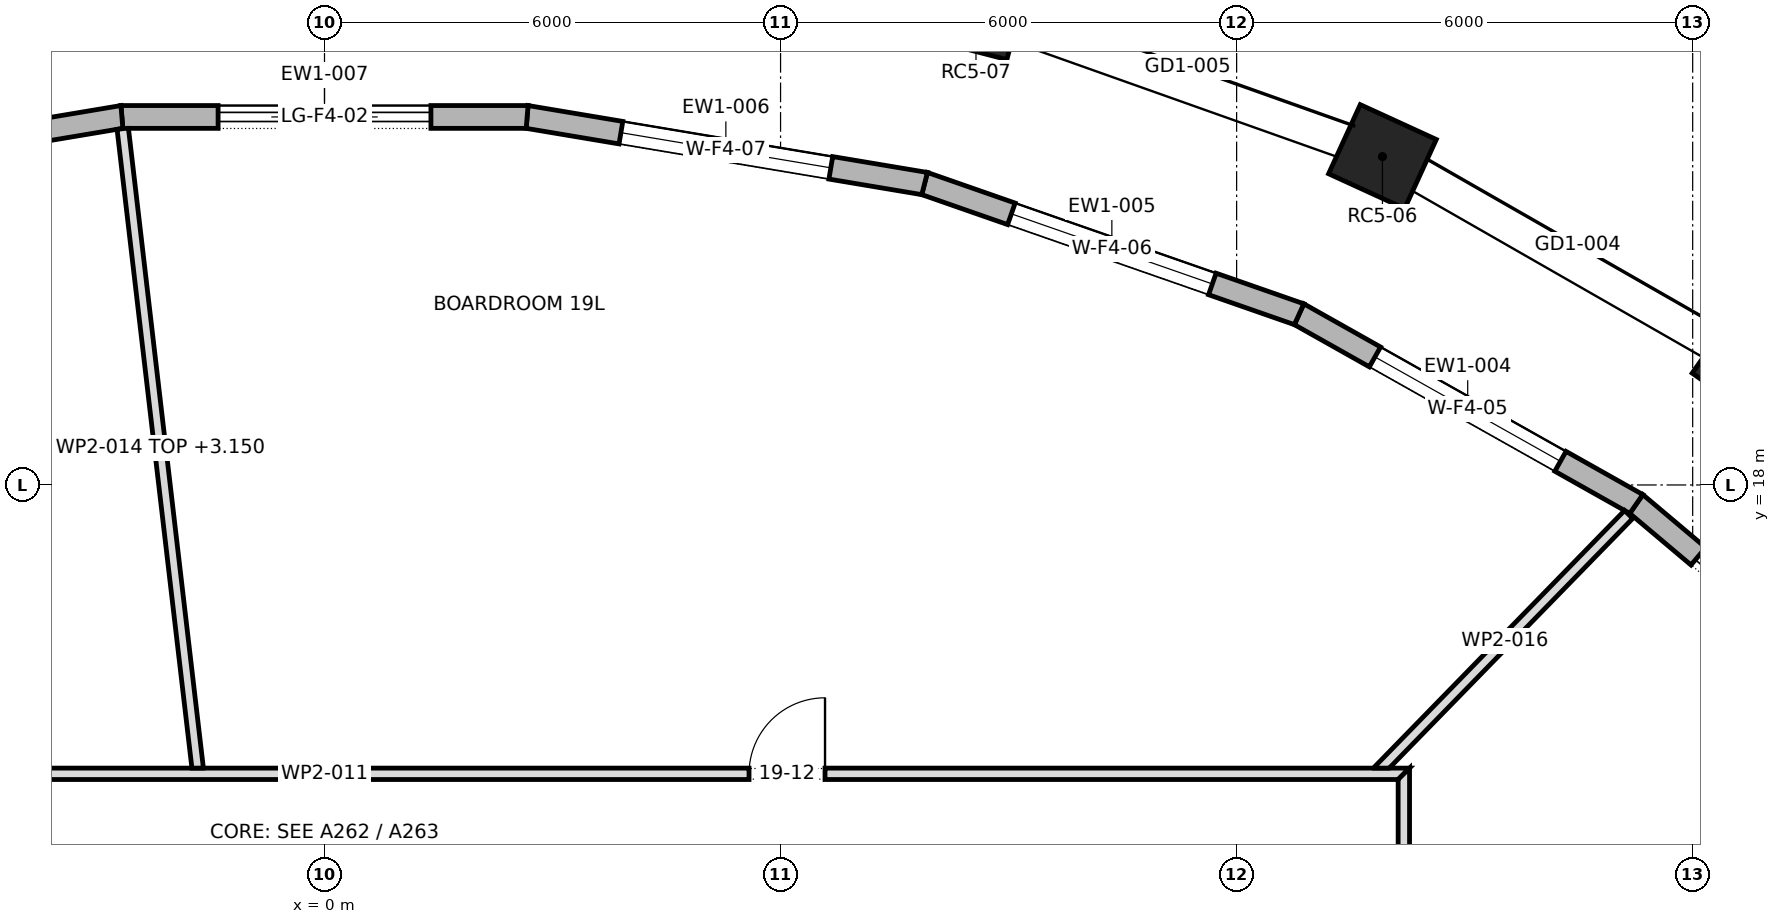
"""IFC4 building model, lengths in metres.
Left out: names, types, materials, properties, quantities, classifications, styles, units other than length and angle.
Written with IfcOpenShell. Run it as: python <this file> out.ifc"""

import sys

from ifc_helpers import new_model, si_unit, direction, frame, frame_2d, origin, origin_2d, place, context, subcontext, project, spatial, polyline, rectangle, outline, extrude, element, fill, save


model = new_model("IFC4")
c1 = context("Model", 3, precision=1e-05, world=origin(), true_north=direction((0.0, 1.0)))
c2 = subcontext(c1, "Body", "Model", "MODEL_VIEW")
j1 = project(units=[si_unit("LENGTHUNIT", "METRE"), si_unit("PLANEANGLEUNIT", "RADIAN")], contexts=[c1])
p1 = place(None, origin())
s1 = spatial("IfcSite", under=j1, at=p1, CompositionType="ELEMENT")
p2 = place(p1, origin())
s2 = spatial("IfcBuilding", under=s1, at=p2, CompositionType="ELEMENT")
p3 = place(p2, frame((0.0, 0.0, 276.3)))
s3 = spatial("IfcBuildingStorey", under=s2, at=p3, CompositionType="ELEMENT", Elevation=276.3)
for number, where, z_axis, x_axis in (
    (1, (18.731, 19.564, 0.0), (0.0, 0.0, 1.0), (-0.818, 0.575, 0.0)),
    (2, (13.919, 22.32, 0.0), (0.0, 0.0, 1.0), (-0.909, 0.417, 0.0)),
    (3, (8.571, 24.219, 0.0), (0.0, 0.0, 1.0), (-0.968, 0.252, 0.0)),
):
    element("IfcColumn", number, at=place(p3, frame(where, z_axis=z_axis, x_axis=x_axis)), inside=s3, PredefinedType="COLUMN", context=c2, shape_type="SweptSolid", body=[
        extrude(rectangle(XDim=1.1, YDim=1.0, at=origin_2d()), origin(), (0.0, 0.0, 1.0), 4.0),
    ])
p4 = place(p3, frame((21.032, 14.57, 0.0), z_axis=(0.0, 0.0, 1.0), x_axis=(-0.764832940795, 0.644228664897, 0.0)))
e4 = element("IfcWall", 4, at=p4, inside=s3, PredefinedType="STANDARD", context=c2, shape_type="SweptSolid", body=[
    extrude(outline(polyline([(-0.015, -0.15), (4.949, -0.15), (4.921, 0.15), (0.015, 0.15), (-0.015, -0.15)])), origin(), (0.0, 0.0, 1.0), 3.7),
])
p5 = place(p4, frame((1.068, 0.0, 0.0)))
e5 = element("IfcOpeningElement", 5, at=p5, cuts=e4, PredefinedType="OPENING", context=c2, shape_type="SweptSolid", body=[
    extrude(rectangle(XDim=2.8, YDim=3.25, at=frame_2d((1.4, 1.625))), frame((0.0, 0.162, 0.0), z_axis=(0.0, -1.0, 0.0), x_axis=(1.0, 0.0, 0.0)), (0.0, 0.0, 1.0), 0.324),
])
p6 = place(p3, frame((17.258, 17.75, 0.0), z_axis=(0.0, 0.0, 1.0), x_axis=(-0.871433320402, 0.490513983585, 0.0)))
e6 = element("IfcWall", 6, at=p6, inside=s3, PredefinedType="STANDARD", context=c2, shape_type="SweptSolid", body=[
    extrude(outline(polyline([(-0.014, -0.15), (5.104, -0.15), (5.077, 0.15), (0.014, 0.15), (-0.014, -0.15)])), origin(), (0.0, 0.0, 1.0), 3.7),
])
p7 = place(p6, frame((1.145, 0.0, 0.6)))
e7 = element("IfcOpeningElement", 7, at=p7, cuts=e6, PredefinedType="OPENING", context=c2, shape_type="SweptSolid", body=[
    extrude(rectangle(XDim=2.8, YDim=2.65, at=frame_2d((1.4, 1.325))), frame((0.0, 0.162, 0.0), z_axis=(0.0, -1.0, 0.0), x_axis=(1.0, 0.0, 0.0)), (0.0, 0.0, 1.0), 0.324),
])
p8 = place(p3, frame((12.822, 20.246, 0.0), z_axis=(0.0, 0.0, 1.0), x_axis=(-0.9441693858, 0.329460423904, 0.0)))
e8 = element("IfcWall", 8, at=p8, inside=s3, PredefinedType="STANDARD", context=c2, shape_type="SweptSolid", body=[
    extrude(outline(polyline([(-0.013, -0.15), (5.231, -0.15), (5.206, 0.15), (0.013, 0.15), (-0.013, -0.15)])), origin(), (0.0, 0.0, 1.0), 3.7),
])
p9 = place(p8, frame((1.209, 0.0, 0.6)))
e9 = element("IfcOpeningElement", 9, at=p9, cuts=e8, PredefinedType="OPENING", context=c2, shape_type="SweptSolid", body=[
    extrude(rectangle(XDim=2.8, YDim=2.65, at=frame_2d((1.4, 1.325))), frame((0.0, 0.162, 0.0), z_axis=(0.0, -1.0, 0.0), x_axis=(1.0, 0.0, 0.0)), (0.0, 0.0, 1.0), 0.324),
])
p10 = place(p3, frame((7.895, 21.966, 0.0), z_axis=(0.0, 0.0, 1.0), x_axis=(-0.986250435411, 0.165257612993, 0.0)))
e10 = element("IfcWall", 10, at=p10, inside=s3, PredefinedType="STANDARD", context=c2, shape_type="SweptSolid", body=[
    extrude(outline(polyline([(-0.013, -0.15), (5.315, -0.15), (5.29, 0.15), (0.013, 0.15), (-0.013, -0.15)])), origin(), (0.0, 0.0, 1.0), 3.7),
])
p11 = place(p10, frame((1.251, 0.0, 0.6)))
e11 = element("IfcOpeningElement", 11, at=p11, cuts=e10, PredefinedType="OPENING", context=c2, shape_type="SweptSolid", body=[
    extrude(rectangle(XDim=2.8, YDim=2.65, at=frame_2d((1.4, 1.325))), frame((0.0, 0.162, 0.0), z_axis=(0.0, -1.0, 0.0), x_axis=(1.0, 0.0, 0.0)), (0.0, 0.0, 1.0), 0.324),
])
p12 = place(p3, frame((2.666, 22.842, 0.0), z_axis=(0.0, 0.0, 1.0), x_axis=(-1.0, 0.0, 0.0)))
e12 = element("IfcWall", 12, at=p12, inside=s3, PredefinedType="STANDARD", context=c2, shape_type="SweptSolid", body=[
    extrude(outline(polyline([(-0.012, -0.15), (5.344, -0.15), (5.319, 0.15), (0.012, 0.15), (-0.012, -0.15)])), origin(), (0.0, 0.0, 1.0), 3.7),
])
p13 = place(p12, frame((1.266, 0.0, 0.0)))
e13 = element("IfcOpeningElement", 13, at=p13, cuts=e12, PredefinedType="OPENING", context=c2, shape_type="SweptSolid", body=[
    extrude(rectangle(XDim=2.8, YDim=3.25, at=frame_2d((1.4, 1.625))), frame((0.0, 0.162, 0.0), z_axis=(0.0, -1.0, 0.0), x_axis=(1.0, 0.0, 0.0)), (0.0, 0.0, 1.0), 0.324),
])
p14 = place(p3, frame((-2.666, 22.842, 0.0), z_axis=(0.0, 0.0, 1.0), x_axis=(-0.986250435411, -0.165257612993, 0.0)))
e14 = element("IfcWall", 14, at=p14, inside=s3, PredefinedType="STANDARD", context=c2, shape_type="SweptSolid", body=[
    extrude(outline(polyline([(-0.012, -0.15), (5.315, -0.15), (5.29, 0.15), (0.012, 0.15), (-0.012, -0.15)])), origin(), (0.0, 0.0, 1.0), 3.7),
])
p15 = place(p14, frame((1.251, 0.0, 0.6)))
e15 = element("IfcOpeningElement", 15, at=p15, cuts=e14, PredefinedType="OPENING", context=c2, shape_type="SweptSolid", body=[
    extrude(rectangle(XDim=2.8, YDim=2.65, at=frame_2d((1.4, 1.325))), frame((0.0, 0.162, 0.0), z_axis=(0.0, -1.0, 0.0), x_axis=(1.0, 0.0, 0.0)), (0.0, 0.0, 1.0), 0.324),
])
p16 = place(p3, frame((-14.275, 14.2, 0.0), z_axis=(0.0, 0.0, 1.0), x_axis=(1.0, 0.0, 0.0)))
e16 = element("IfcWall", 16, at=p16, inside=s3, PredefinedType="PARTITIONING", context=c2, shape_type="SweptSolid", body=[
    extrude(outline(polyline([(0.15, -0.075), (2.033, -0.075), (3.917, -0.075), (5.8, -0.075), (7.683, -0.075), (9.567, -0.075), (11.45, -0.075), (13.333, -0.075), (15.217, -0.075), (17.1, -0.075), (18.983, -0.075), (20.866, -0.075), (22.75, -0.075), (24.633, -0.075), (26.517, -0.075), (28.4, -0.075), (28.55, 0.075), (28.55, 0.075), (26.646, 0.075), (24.743, 0.075), (22.84, 0.075), (20.937, 0.075), (19.033, 0.075), (17.13, 0.075), (15.227, 0.075), (13.323, 0.075), (11.42, 0.075), (9.517, 0.075), (7.613, 0.075), (5.71, 0.075), (3.807, 0.075), (1.903, 0.075), (0.0, 0.075), (0.15, -0.075)])), origin(), (0.0, 0.0, 1.0), 3.7),
])
p17 = place(p16, frame((5.845, 0.0, 0.0)))
e17 = element("IfcOpeningElement", 17, at=p17, cuts=e16, PredefinedType="OPENING", context=c2, shape_type="SweptSolid", body=[
    extrude(rectangle(XDim=1.0, YDim=2.1, at=frame_2d((0.5, 1.05))), frame((0.0, 0.087, 0.0), z_axis=(0.0, -1.0, 0.0), x_axis=(1.0, 0.0, 0.0)), (0.0, 0.0, 1.0), 0.174),
])
p18 = place(p16, frame((19.86, 0.0, 0.0)))
e18 = element("IfcOpeningElement", 18, at=p18, cuts=e16, PredefinedType="OPENING", context=c2, shape_type="SweptSolid", body=[
    extrude(rectangle(XDim=1.0, YDim=2.1, at=frame_2d((0.5, 1.05))), frame((0.0, 0.087, 0.0), z_axis=(0.0, -1.0, 0.0), x_axis=(1.0, 0.0, 0.0)), (0.0, 0.0, 1.0), 0.174),
])
p19 = place(p3, frame((-2.655, 22.688, 0.0), z_axis=(0.0, 0.0, 1.0), x_axis=(0.116390143686, -0.993203571506, 0.0)))
e19 = element("IfcWall", 19, at=p19, inside=s3, PredefinedType="PARTITIONING", context=c2, shape_type="SweptSolid", body=[
    extrude(outline(polyline([(0.0, -0.075), (1.692, -0.075), (3.385, -0.075), (5.077, -0.075), (6.769, -0.075), (8.461, -0.075), (8.479, 0.072), (8.479, 0.075), (6.784, 0.075), (5.089, 0.075), (3.394, 0.075), (1.699, 0.075), (0.005, 0.075), (0.0, 0.036), (0.0, -0.075)])), origin(), (0.0, 0.0, 1.0), 3.15),
])
p20 = place(p3, frame((13.852, 14.223, 0.0), z_axis=(0.0, 0.0, 1.0), x_axis=(0.69820654799, 0.715896372629, 0.0)))
e20 = element("IfcWall", 20, at=p20, inside=s3, PredefinedType="PARTITIONING", context=c2, shape_type="SweptSolid", body=[
    extrude(outline(polyline([(4.734, -0.075), (4.734, 0.075), (4.734, 0.075), (3.156, 0.075), (1.578, 0.075), (0.0, 0.075), (0.0, 0.075), (0.146, -0.075), (1.675, -0.075), (3.205, -0.075), (4.734, -0.075)])), origin(), (0.0, 0.0, 1.0), 3.7),
])
p21 = place(p3, frame((14.2, -14.275, 0.0), z_axis=(0.0, 0.0, 1.0), x_axis=(0.0, 1.0, 0.0)))
e21 = element("IfcWall", 21, at=p21, inside=s3, PredefinedType="PARTITIONING", context=c2, shape_type="SweptSolid", body=[
    extrude(outline(polyline([(28.55, -0.075), (28.55, -0.075), (28.4, 0.075), (26.517, 0.075), (24.633, 0.075), (22.75, 0.075), (20.866, 0.075), (18.983, 0.075), (17.1, 0.075), (15.217, 0.075), (13.333, 0.075), (11.45, 0.075), (9.567, 0.075), (7.683, 0.075), (5.8, 0.075), (3.917, 0.075), (2.033, 0.075), (0.15, 0.075), (0.0, -0.075), (1.903, -0.075), (3.807, -0.075), (5.71, -0.075), (7.613, -0.075), (9.517, -0.075), (11.42, -0.075), (13.323, -0.075), (15.227, -0.075), (17.13, -0.075), (19.033, -0.075), (20.937, -0.075), (22.84, -0.075), (24.743, -0.075), (26.646, -0.075), (28.55, -0.075)])), origin(), (0.0, 0.0, 1.0), 3.7),
])
p22 = place(p21, frame((3.48, 0.0, 0.0)))
e22 = element("IfcOpeningElement", 22, at=p22, cuts=e21, PredefinedType="OPENING", context=c2, shape_type="SweptSolid", body=[
    extrude(rectangle(XDim=1.0, YDim=2.1, at=frame_2d((0.5, 1.05))), frame((0.0, 0.087, 0.0), z_axis=(0.0, -1.0, 0.0), x_axis=(1.0, 0.0, 0.0)), (0.0, 0.0, 1.0), 0.174),
])
p23 = place(p21, frame((9.99, 0.0, 0.0)))
e23 = element("IfcOpeningElement", 23, at=p23, cuts=e21, PredefinedType="OPENING", context=c2, shape_type="SweptSolid", body=[
    extrude(rectangle(XDim=1.0, YDim=2.1, at=frame_2d((0.5, 1.05))), frame((0.0, 0.087, 0.0), z_axis=(0.0, -1.0, 0.0), x_axis=(1.0, 0.0, 0.0)), (0.0, 0.0, 1.0), 0.174),
])
p24 = place(p21, frame((15.0, 0.0, 0.0)))
e24 = element("IfcOpeningElement", 24, at=p24, cuts=e21, PredefinedType="OPENING", context=c2, shape_type="SweptSolid", body=[
    extrude(rectangle(XDim=1.0, YDim=2.1, at=frame_2d((0.5, 1.05))), frame((0.0, 0.087, 0.0), z_axis=(0.0, -1.0, 0.0), x_axis=(1.0, 0.0, 0.0)), (0.0, 0.0, 1.0), 0.174),
])
p25 = place(p21, frame((22.69, 0.0, 0.0)))
e25 = element("IfcOpeningElement", 25, at=p25, cuts=e21, PredefinedType="OPENING", context=c2, shape_type="SweptSolid", body=[
    extrude(rectangle(XDim=1.0, YDim=2.1, at=frame_2d((0.5, 1.05))), frame((0.0, 0.087, 0.0), z_axis=(0.0, -1.0, 0.0), x_axis=(1.0, 0.0, 0.0)), (0.0, 0.0, 1.0), 0.174),
])
p26 = place(p5, origin())
e26 = element("IfcDoor", 26, at=p26, inside=s3, OperationType="DOUBLE_DOOR_SLIDING", PredefinedType="DOOR", context=c2, shape_type="SweptSolid", body=[
    extrude(rectangle(XDim=2.8, YDim=3.25, at=frame_2d((1.4, 1.625))), frame((0.0, 0.025, 0.0), z_axis=(0.0, -1.0, 0.0), x_axis=(1.0, 0.0, 0.0)), (0.0, 0.0, 1.0), 0.05),
])
fill(e5, e26)
p27 = place(p7, origin())
e27 = element("IfcWindow", 27, at=p27, inside=s3, PartitioningType="DOUBLE_PANEL_VERTICAL", PredefinedType="WINDOW", context=c2, shape_type="SweptSolid", body=[
    extrude(rectangle(XDim=2.8, YDim=2.65, at=frame_2d((1.4, 1.325))), frame((0.0, 0.03, 0.0), z_axis=(0.0, -1.0, 0.0), x_axis=(1.0, 0.0, 0.0)), (0.0, 0.0, 1.0), 0.06),
])
fill(e7, e27)
p28 = place(p9, origin())
e28 = element("IfcWindow", 28, at=p28, inside=s3, PartitioningType="DOUBLE_PANEL_VERTICAL", PredefinedType="WINDOW", context=c2, shape_type="SweptSolid", body=[
    extrude(rectangle(XDim=2.8, YDim=2.65, at=frame_2d((1.4, 1.325))), frame((0.0, 0.03, 0.0), z_axis=(0.0, -1.0, 0.0), x_axis=(1.0, 0.0, 0.0)), (0.0, 0.0, 1.0), 0.06),
])
fill(e9, e28)
p29 = place(p11, origin())
e29 = element("IfcWindow", 29, at=p29, inside=s3, PartitioningType="DOUBLE_PANEL_VERTICAL", PredefinedType="WINDOW", context=c2, shape_type="SweptSolid", body=[
    extrude(rectangle(XDim=2.8, YDim=2.65, at=frame_2d((1.4, 1.325))), frame((0.0, 0.03, 0.0), z_axis=(0.0, -1.0, 0.0), x_axis=(1.0, 0.0, 0.0)), (0.0, 0.0, 1.0), 0.06),
])
fill(e11, e29)
p30 = place(p13, origin())
e30 = element("IfcDoor", 30, at=p30, inside=s3, OperationType="DOUBLE_DOOR_SLIDING", PredefinedType="DOOR", context=c2, shape_type="SweptSolid", body=[
    extrude(rectangle(XDim=2.8, YDim=3.25, at=frame_2d((1.4, 1.625))), frame((0.0, 0.025, 0.0), z_axis=(0.0, -1.0, 0.0), x_axis=(1.0, 0.0, 0.0)), (0.0, 0.0, 1.0), 0.05),
])
fill(e13, e30)
p31 = place(p18, origin())
e31 = element("IfcDoor", 31, at=p31, inside=s3, OperationType="SINGLE_SWING_LEFT", PredefinedType="DOOR", context=c2, shape_type="SweptSolid", body=[
    extrude(rectangle(XDim=1.0, YDim=2.1, at=frame_2d((0.5, 1.05))), frame((0.0, 0.025, 0.0), z_axis=(0.0, -1.0, 0.0), x_axis=(1.0, 0.0, 0.0)), (0.0, 0.0, 1.0), 0.05),
])
fill(e18, e31)
save(model, sys.argv[1])
